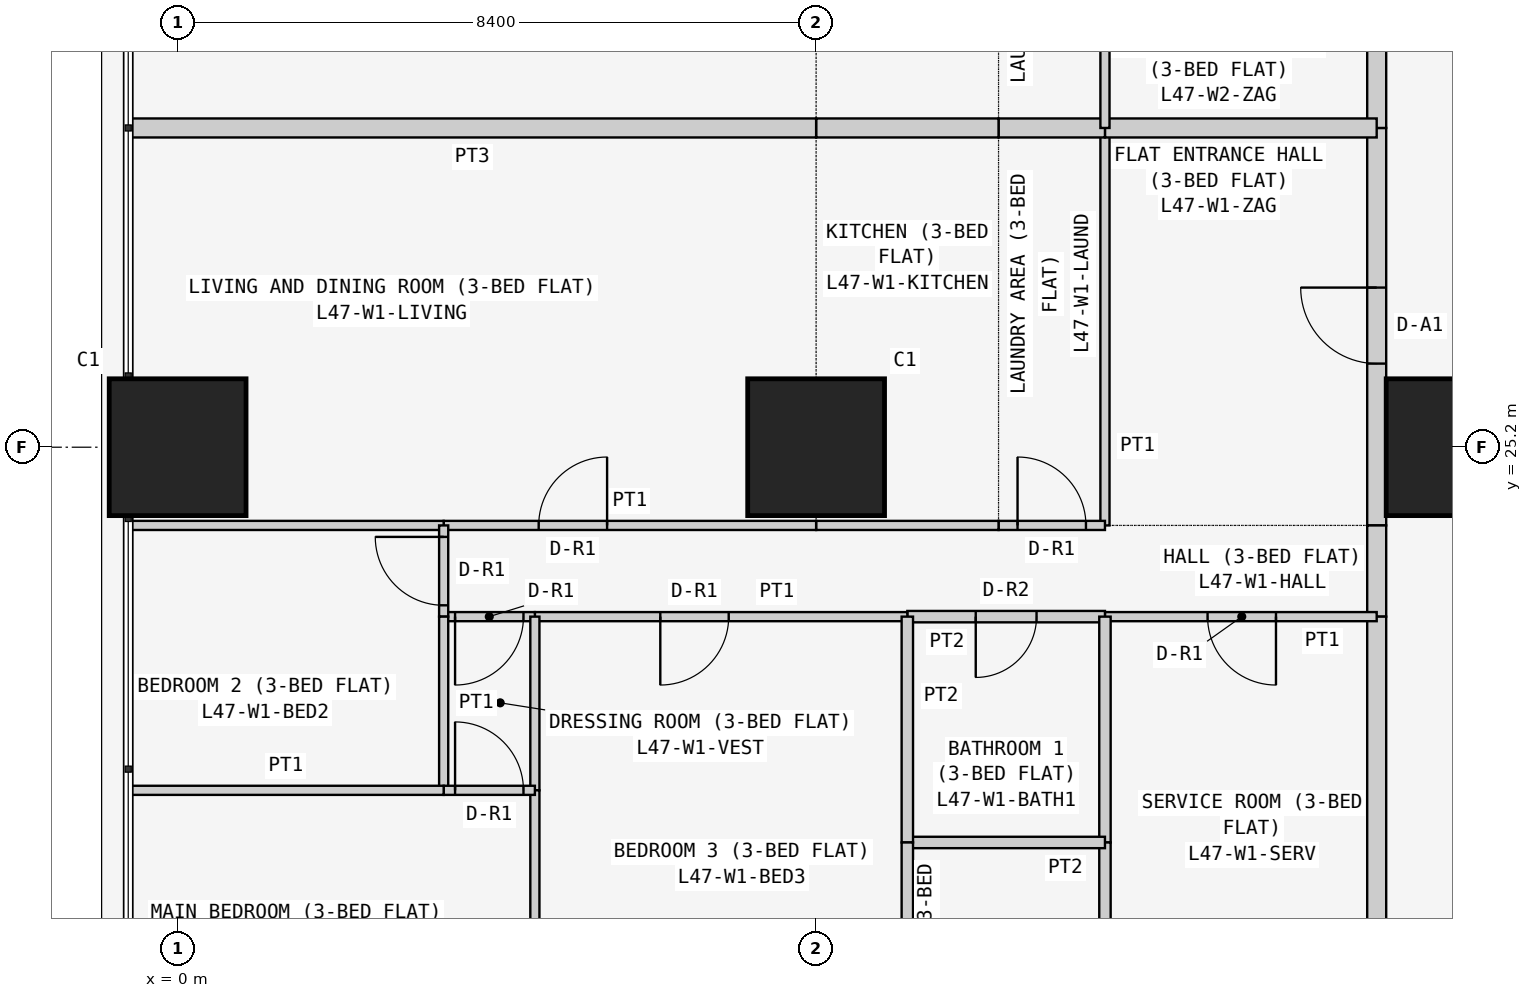
"""IFC4 building model, lengths in metres.
Left out: names, types, materials, properties, quantities, classifications, styles, units other than length and angle.
Written with IfcOpenShell. Run it as: python <this file> out.ifc"""

import sys

from ifc_helpers import new_model, si_unit, direction, frame, frame_2d, origin, origin_2d, place, context, subcontext, project, spatial, rectangle, extrude, element, fill, save


model = new_model("IFC4")
c1 = context("Model", 3, precision=1e-05, world=origin(), true_north=direction((0.0, 1.0)))
c2 = subcontext(c1, "Body", "Model", "MODEL_VIEW")
j1 = project(units=[si_unit("LENGTHUNIT", "METRE"), si_unit("PLANEANGLEUNIT", "RADIAN")], contexts=[c1])
p1 = place(None, origin())
s1 = spatial("IfcSite", under=j1, at=p1, CompositionType="ELEMENT")
p2 = place(p1, origin())
s2 = spatial("IfcBuilding", under=s1, at=p2, CompositionType="ELEMENT")
p3 = place(p2, frame((0.0, 0.0, 183.3)))
s3 = spatial("IfcBuildingStorey", under=s2, at=p3, CompositionType="ELEMENT", Elevation=183.3)
for number, where, z_axis, x_axis in (
    (1, (0.0, 25.2, 0.0), (0.0, 0.0, 1.0), (1.0, 0.0, 0.0)),
    (2, (8.4, 25.2, 0.0), (0.0, 0.0, 1.0), (1.0, 0.0, 0.0)),
    (3, (16.8, 25.2, 0.0), (0.0, 0.0, 1.0), (1.0, 0.0, 0.0)),
):
    element("IfcColumn", number, at=place(p3, frame(where, z_axis=z_axis, x_axis=x_axis)), inside=s3, PredefinedType="COLUMN", context=c2, shape_type="SweptSolid", body=[
        extrude(rectangle(XDim=1.8, YDim=1.8, at=origin_2d()), origin(), (0.0, 0.0, 1.0), 3.6),
    ])
p4 = place(p3, frame((15.775, 24.171, 0.0), z_axis=(0.0, 0.0, 1.0), x_axis=(0.0, 1.0, 0.0)))
e4 = element("IfcWall", 4, at=p4, inside=s3, PredefinedType="PARTITIONING", context=c2, shape_type="SweptSolid", body=[
    extrude(rectangle(XDim=5.229, YDim=0.25, at=frame_2d((2.615, 0.0))), origin(), (0.0, 0.0, 1.0), 3.45),
])
p5 = place(p4, frame((2.129, 0.0, 0.0)))
e5 = element("IfcOpeningElement", 5, at=p5, cuts=e4, PredefinedType="OPENING", context=c2, shape_type="SweptSolid", body=[
    extrude(rectangle(XDim=1.0, YDim=2.1, at=frame_2d((0.5, 1.05))), frame((0.0, 0.135, 0.0), z_axis=(0.0, -1.0, 0.0), x_axis=(1.0, 0.0, 0.0)), (0.0, 0.0, 1.0), 0.27),
])
p6 = place(p3, frame((15.775, 22.971, 0.0), z_axis=(0.0, 0.0, 1.0), x_axis=(0.0, 1.0, 0.0)))
e6 = element("IfcWall", 6, at=p6, inside=s3, PredefinedType="PARTITIONING", context=c2, shape_type="SweptSolid", body=[
    extrude(rectangle(XDim=1.2, YDim=0.25, at=frame_2d((0.6, 0.0))), origin(), (0.0, 0.0, 1.0), 3.45),
])
p7 = place(p3, frame((15.775, 16.1, 0.0), z_axis=(0.0, 0.0, 1.0), x_axis=(0.0, 1.0, 0.0)))
e7 = element("IfcWall", 7, at=p7, inside=s3, PredefinedType="PARTITIONING", context=c2, shape_type="SweptSolid", body=[
    extrude(rectangle(XDim=6.871, YDim=0.25, at=frame_2d((3.436, 0.0))), origin(), (0.0, 0.0, 1.0), 3.45),
])
p8 = place(p3, frame((15.775, 29.4, 0.0), z_axis=(0.0, 0.0, 1.0), x_axis=(0.0, 1.0, 0.0)))
e8 = element("IfcWall", 8, at=p8, inside=s3, PredefinedType="PARTITIONING", context=c2, shape_type="SweptSolid", body=[
    extrude(rectangle(XDim=5.229, YDim=0.25, at=frame_2d((2.615, 0.0))), origin(), (0.0, 0.0, 1.0), 3.45),
])
p9 = place(p8, frame((2.1, 0.0, 0.0)))
e9 = element("IfcOpeningElement", 9, at=p9, cuts=e8, PredefinedType="OPENING", context=c2, shape_type="SweptSolid", body=[
    extrude(rectangle(XDim=1.0, YDim=2.1, at=frame_2d((0.5, 1.05))), frame((0.0, 0.135, 0.0), z_axis=(0.0, -1.0, 0.0), x_axis=(1.0, 0.0, 0.0)), (0.0, 0.0, 1.0), 0.27),
])
p10 = place(p3, frame((12.2, 29.4, 0.0), z_axis=(0.0, 0.0, 1.0), x_axis=(0.0, -1.0, 0.0)))
e10 = element("IfcWall", 10, at=p10, inside=s3, PredefinedType="PARTITIONING", context=c2, shape_type="SweptSolid", body=[
    extrude(rectangle(XDim=5.229, YDim=0.12, at=frame_2d((2.615, 0.0))), origin(), (0.0, 0.0, 1.0), 3.45),
])
p11 = place(p3, frame((15.775, 29.4, 0.0), z_axis=(0.0, 0.0, 1.0), x_axis=(-1.0, 0.0, 0.0)))
e11 = element("IfcWall", 11, at=p11, inside=s3, PredefinedType="PARTITIONING", context=c2, shape_type="SweptSolid", body=[
    extrude(rectangle(XDim=3.575, YDim=0.25, at=frame_2d((1.788, 0.0))), origin(), (0.0, 0.0, 1.0), 3.45),
])
p12 = place(p3, frame((10.8, 24.171, 0.0), z_axis=(0.0, 0.0, 1.0), x_axis=(1.0, 0.0, 0.0)))
e12 = element("IfcWall", 12, at=p12, inside=s3, PredefinedType="PARTITIONING", context=c2, shape_type="SweptSolid", body=[
    extrude(rectangle(XDim=1.4, YDim=0.12, at=frame_2d((0.7, 0.0))), origin(), (0.0, 0.0, 1.0), 3.45),
])
p13 = place(p12, frame((0.25, 0.0, 0.0)))
e13 = element("IfcOpeningElement", 13, at=p13, cuts=e12, PredefinedType="OPENING", context=c2, shape_type="SweptSolid", body=[
    extrude(rectangle(XDim=0.9, YDim=2.1, at=frame_2d((0.45, 1.05))), frame((0.0, 0.07, 0.0), z_axis=(0.0, -1.0, 0.0), x_axis=(1.0, 0.0, 0.0)), (0.0, 0.0, 1.0), 0.14),
])
p14 = place(p3, frame((12.2, 29.4, 0.0), z_axis=(0.0, 0.0, 1.0), x_axis=(-1.0, 0.0, 0.0)))
e14 = element("IfcWall", 14, at=p14, inside=s3, PredefinedType="PARTITIONING", context=c2, shape_type="SweptSolid", body=[
    extrude(rectangle(XDim=1.4, YDim=0.25, at=frame_2d((0.7, 0.0))), origin(), (0.0, 0.0, 1.0), 3.45),
])
p15 = place(p3, frame((8.4, 24.171, 0.0), z_axis=(0.0, 0.0, 1.0), x_axis=(1.0, 0.0, 0.0)))
e15 = element("IfcWall", 15, at=p15, inside=s3, PredefinedType="PARTITIONING", context=c2, shape_type="SweptSolid", body=[
    extrude(rectangle(XDim=2.4, YDim=0.12, at=frame_2d((1.2, 0.0))), origin(), (0.0, 0.0, 1.0), 3.45),
])
p16 = place(p3, frame((10.8, 29.4, 0.0), z_axis=(0.0, 0.0, 1.0), x_axis=(-1.0, 0.0, 0.0)))
e16 = element("IfcWall", 16, at=p16, inside=s3, PredefinedType="PARTITIONING", context=c2, shape_type="SweptSolid", body=[
    extrude(rectangle(XDim=2.4, YDim=0.25, at=frame_2d((1.2, 0.0))), origin(), (0.0, 0.0, 1.0), 3.45),
])
p17 = place(p3, frame((3.5, 24.171, 0.0), z_axis=(0.0, 0.0, 1.0), x_axis=(1.0, 0.0, 0.0)))
e17 = element("IfcWall", 17, at=p17, inside=s3, PredefinedType="PARTITIONING", context=c2, shape_type="SweptSolid", body=[
    extrude(rectangle(XDim=4.9, YDim=0.12, at=frame_2d((2.45, 0.0))), origin(), (0.0, 0.0, 1.0), 3.45),
])
p18 = place(p17, frame((1.25, 0.0, 0.0)))
e18 = element("IfcOpeningElement", 18, at=p18, cuts=e17, PredefinedType="OPENING", context=c2, shape_type="SweptSolid", body=[
    extrude(rectangle(XDim=0.9, YDim=2.1, at=frame_2d((0.45, 1.05))), frame((0.0, 0.07, 0.0), z_axis=(0.0, -1.0, 0.0), x_axis=(1.0, 0.0, 0.0)), (0.0, 0.0, 1.0), 0.14),
])
p19 = place(p3, frame((-0.65, 24.171, 0.0), z_axis=(0.0, 0.0, 1.0), x_axis=(1.0, 0.0, 0.0)))
e19 = element("IfcWall", 19, at=p19, inside=s3, PredefinedType="PARTITIONING", context=c2, shape_type="SweptSolid", body=[
    extrude(rectangle(XDim=4.15, YDim=0.12, at=frame_2d((2.075, 0.0))), origin(), (0.0, 0.0, 1.0), 3.45),
])
p20 = place(p3, frame((8.4, 29.4, 0.0), z_axis=(0.0, 0.0, 1.0), x_axis=(-1.0, 0.0, 0.0)))
e20 = element("IfcWall", 20, at=p20, inside=s3, PredefinedType="PARTITIONING", context=c2, shape_type="SweptSolid", body=[
    extrude(rectangle(XDim=9.05, YDim=0.25, at=frame_2d((4.525, 0.0))), origin(), (0.0, 0.0, 1.0), 3.45),
])
p21 = place(p3, frame((12.2, 22.971, 0.0), z_axis=(0.0, 0.0, 1.0), x_axis=(1.0, 0.0, 0.0)))
e21 = element("IfcWall", 21, at=p21, inside=s3, PredefinedType="PARTITIONING", context=c2, shape_type="SweptSolid", body=[
    extrude(rectangle(XDim=3.575, YDim=0.12, at=frame_2d((1.788, 0.0))), origin(), (0.0, 0.0, 1.0), 3.45),
])
p22 = place(p21, frame((1.35, 0.0, 0.0)))
e22 = element("IfcOpeningElement", 22, at=p22, cuts=e21, PredefinedType="OPENING", context=c2, shape_type="SweptSolid", body=[
    extrude(rectangle(XDim=0.9, YDim=2.1, at=frame_2d((0.45, 1.05))), frame((0.0, 0.07, 0.0), z_axis=(0.0, -1.0, 0.0), x_axis=(1.0, 0.0, 0.0)), (0.0, 0.0, 1.0), 0.14),
])
p23 = place(p3, frame((9.6, 22.971, 0.0), z_axis=(0.0, 0.0, 1.0), x_axis=(1.0, 0.0, 0.0)))
e23 = element("IfcWall", 23, at=p23, inside=s3, PredefinedType="PARTITIONING", context=c2, shape_type="SweptSolid", body=[
    extrude(rectangle(XDim=2.6, YDim=0.15, at=frame_2d((1.3, 0.0))), origin(), (0.0, 0.0, 1.0), 3.45),
])
p24 = place(p23, frame((0.9, 0.0, 0.0)))
e24 = element("IfcOpeningElement", 24, at=p24, cuts=e23, PredefinedType="OPENING", context=c2, shape_type="SweptSolid", body=[
    extrude(rectangle(XDim=0.8, YDim=2.1, at=frame_2d((0.4, 1.05))), frame((0.0, 0.085, 0.0), z_axis=(0.0, -1.0, 0.0), x_axis=(1.0, 0.0, 0.0)), (0.0, 0.0, 1.0), 0.17),
])
p25 = place(p3, frame((4.7, 22.971, 0.0), z_axis=(0.0, 0.0, 1.0), x_axis=(1.0, 0.0, 0.0)))
e25 = element("IfcWall", 25, at=p25, inside=s3, PredefinedType="PARTITIONING", context=c2, shape_type="SweptSolid", body=[
    extrude(rectangle(XDim=4.9, YDim=0.12, at=frame_2d((2.45, 0.0))), origin(), (0.0, 0.0, 1.0), 3.45),
])
p26 = place(p25, frame((1.65, 0.0, 0.0)))
e26 = element("IfcOpeningElement", 26, at=p26, cuts=e25, PredefinedType="OPENING", context=c2, shape_type="SweptSolid", body=[
    extrude(rectangle(XDim=0.9, YDim=2.1, at=frame_2d((0.45, 1.05))), frame((0.0, 0.07, 0.0), z_axis=(0.0, -1.0, 0.0), x_axis=(1.0, 0.0, 0.0)), (0.0, 0.0, 1.0), 0.14),
])
p27 = place(p3, frame((3.5, 22.971, 0.0), z_axis=(0.0, 0.0, 1.0), x_axis=(1.0, 0.0, 0.0)))
e27 = element("IfcWall", 27, at=p27, inside=s3, PredefinedType="PARTITIONING", context=c2, shape_type="SweptSolid", body=[
    extrude(rectangle(XDim=1.2, YDim=0.12, at=frame_2d((0.6, 0.0))), origin(), (0.0, 0.0, 1.0), 3.45),
])
p28 = place(p27, frame((0.15, 0.0, 0.0)))
e28 = element("IfcOpeningElement", 28, at=p28, cuts=e27, PredefinedType="OPENING", context=c2, shape_type="SweptSolid", body=[
    extrude(rectangle(XDim=0.9, YDim=2.1, at=frame_2d((0.45, 1.05))), frame((0.0, 0.07, 0.0), z_axis=(0.0, -1.0, 0.0), x_axis=(1.0, 0.0, 0.0)), (0.0, 0.0, 1.0), 0.14),
])
p29 = place(p3, frame((3.5, 24.171, 0.0), z_axis=(0.0, 0.0, 1.0), x_axis=(0.0, -1.0, 0.0)))
e29 = element("IfcWall", 29, at=p29, inside=s3, PredefinedType="PARTITIONING", context=c2, shape_type="SweptSolid", body=[
    extrude(rectangle(XDim=1.2, YDim=0.12, at=frame_2d((0.6, 0.0))), origin(), (0.0, 0.0, 1.0), 3.45),
])
p30 = place(p29, frame((0.151, 0.0, 0.0)))
e30 = element("IfcOpeningElement", 30, at=p30, cuts=e29, PredefinedType="OPENING", context=c2, shape_type="SweptSolid", body=[
    extrude(rectangle(XDim=0.9, YDim=2.1, at=frame_2d((0.45, 1.05))), frame((0.0, 0.07, 0.0), z_axis=(0.0, -1.0, 0.0), x_axis=(1.0, 0.0, 0.0)), (0.0, 0.0, 1.0), 0.14),
])
p31 = place(p3, frame((12.2, 22.971, 0.0), z_axis=(0.0, 0.0, 1.0), x_axis=(0.0, -1.0, 0.0)))
e31 = element("IfcWall", 31, at=p31, inside=s3, PredefinedType="PARTITIONING", context=c2, shape_type="SweptSolid", body=[
    extrude(rectangle(XDim=2.971, YDim=0.15, at=frame_2d((1.485, 0.0))), origin(), (0.0, 0.0, 1.0), 3.45),
])
p32 = place(p3, frame((12.2, 20.0, 0.0), z_axis=(0.0, 0.0, 1.0), x_axis=(0.0, -1.0, 0.0)))
e32 = element("IfcWall", 32, at=p32, inside=s3, PredefinedType="PARTITIONING", context=c2, shape_type="SweptSolid", body=[
    extrude(rectangle(XDim=3.9, YDim=0.15, at=frame_2d((1.95, 0.0))), origin(), (0.0, 0.0, 1.0), 3.45),
])
p33 = place(p32, frame((1.45, 0.0, 0.0)))
e33 = element("IfcOpeningElement", 33, at=p33, cuts=e32, PredefinedType="OPENING", context=c2, shape_type="SweptSolid", body=[
    extrude(rectangle(XDim=0.8, YDim=2.1, at=frame_2d((0.4, 1.05))), frame((0.0, 0.085, 0.0), z_axis=(0.0, -1.0, 0.0), x_axis=(1.0, 0.0, 0.0)), (0.0, 0.0, 1.0), 0.17),
])
p34 = place(p3, frame((9.6, 20.0, 0.0), z_axis=(0.0, 0.0, 1.0), x_axis=(1.0, 0.0, 0.0)))
e34 = element("IfcWall", 34, at=p34, inside=s3, PredefinedType="PARTITIONING", context=c2, shape_type="SweptSolid", body=[
    extrude(rectangle(XDim=2.6, YDim=0.15, at=frame_2d((1.3, 0.0))), origin(), (0.0, 0.0, 1.0), 3.45),
])
p35 = place(p3, frame((9.6, 22.971, 0.0), z_axis=(0.0, 0.0, 1.0), x_axis=(0.0, -1.0, 0.0)))
e35 = element("IfcWall", 35, at=p35, inside=s3, PredefinedType="PARTITIONING", context=c2, shape_type="SweptSolid", body=[
    extrude(rectangle(XDim=2.971, YDim=0.15, at=frame_2d((1.485, 0.0))), origin(), (0.0, 0.0, 1.0), 3.45),
])
p36 = place(p3, frame((9.6, 20.0, 0.0), z_axis=(0.0, 0.0, 1.0), x_axis=(0.0, -1.0, 0.0)))
e36 = element("IfcWall", 36, at=p36, inside=s3, PredefinedType="PARTITIONING", context=c2, shape_type="SweptSolid", body=[
    extrude(rectangle(XDim=3.9, YDim=0.15, at=frame_2d((1.95, 0.0))), origin(), (0.0, 0.0, 1.0), 3.45),
])
p37 = place(p3, frame((4.7, 22.971, 0.0), z_axis=(0.0, 0.0, 1.0), x_axis=(0.0, -1.0, 0.0)))
e37 = element("IfcWall", 37, at=p37, inside=s3, PredefinedType="PARTITIONING", context=c2, shape_type="SweptSolid", body=[
    extrude(rectangle(XDim=2.285, YDim=0.12, at=frame_2d((1.143, 0.0))), origin(), (0.0, 0.0, 1.0), 3.45),
])
p38 = place(p3, frame((4.7, 20.686, 0.0), z_axis=(0.0, 0.0, 1.0), x_axis=(0.0, -1.0, 0.0)))
e38 = element("IfcWall", 38, at=p38, inside=s3, PredefinedType="PARTITIONING", context=c2, shape_type="SweptSolid", body=[
    extrude(rectangle(XDim=4.586, YDim=0.12, at=frame_2d((2.293, 0.0))), origin(), (0.0, 0.0, 1.0), 3.45),
])
p39 = place(p3, frame((3.5, 22.971, 0.0), z_axis=(0.0, 0.0, 1.0), x_axis=(0.0, -1.0, 0.0)))
e39 = element("IfcWall", 39, at=p39, inside=s3, PredefinedType="PARTITIONING", context=c2, shape_type="SweptSolid", body=[
    extrude(rectangle(XDim=2.285, YDim=0.12, at=frame_2d((1.143, 0.0))), origin(), (0.0, 0.0, 1.0), 3.45),
])
p40 = place(p3, frame((3.5, 20.686, 0.0), z_axis=(0.0, 0.0, 1.0), x_axis=(1.0, 0.0, 0.0)))
e40 = element("IfcWall", 40, at=p40, inside=s3, PredefinedType="PARTITIONING", context=c2, shape_type="SweptSolid", body=[
    extrude(rectangle(XDim=1.2, YDim=0.12, at=frame_2d((0.6, 0.0))), origin(), (0.0, 0.0, 1.0), 3.45),
])
p41 = place(p40, frame((0.15, 0.0, 0.0)))
e41 = element("IfcOpeningElement", 41, at=p41, cuts=e40, PredefinedType="OPENING", context=c2, shape_type="SweptSolid", body=[
    extrude(rectangle(XDim=0.9, YDim=2.1, at=frame_2d((0.45, 1.05))), frame((0.0, 0.07, 0.0), z_axis=(0.0, -1.0, 0.0), x_axis=(1.0, 0.0, 0.0)), (0.0, 0.0, 1.0), 0.14),
])
p42 = place(p3, frame((-0.65, 20.686, 0.0), z_axis=(0.0, 0.0, 1.0), x_axis=(1.0, 0.0, 0.0)))
e42 = element("IfcWall", 42, at=p42, inside=s3, PredefinedType="PARTITIONING", context=c2, shape_type="SweptSolid", body=[
    extrude(rectangle(XDim=4.15, YDim=0.12, at=frame_2d((2.075, 0.0))), origin(), (0.0, 0.0, 1.0), 3.45),
])
p43 = place(p3, frame((12.2, 29.4, 0.0), z_axis=(0.0, 0.0, 1.0), x_axis=(0.0, 1.0, 0.0)))
e43 = element("IfcWall", 43, at=p43, inside=s3, PredefinedType="PARTITIONING", context=c2, shape_type="SweptSolid", body=[
    extrude(rectangle(XDim=5.229, YDim=0.12, at=frame_2d((2.615, 0.0))), origin(), (0.0, 0.0, 1.0), 3.45),
])
p44 = place(p5, origin())
e44 = element("IfcDoor", 44, at=p44, inside=s3, OperationType="SINGLE_SWING_RIGHT", PredefinedType="DOOR", context=c2, shape_type="SweptSolid", body=[
    extrude(rectangle(XDim=1.0, YDim=2.1, at=frame_2d((0.5, 1.05))), frame((0.0, 0.025, 0.0), z_axis=(0.0, -1.0, 0.0), x_axis=(1.0, 0.0, 0.0)), (0.0, 0.0, 1.0), 0.05),
])
fill(e5, e44)
p45 = place(p13, origin())
e45 = element("IfcDoor", 45, at=p45, inside=s3, OperationType="SINGLE_SWING_LEFT", PredefinedType="DOOR", context=c2, shape_type="SweptSolid", body=[
    extrude(rectangle(XDim=0.9, YDim=2.1, at=frame_2d((0.45, 1.05))), frame((0.0, 0.025, 0.0), z_axis=(0.0, -1.0, 0.0), x_axis=(1.0, 0.0, 0.0)), (0.0, 0.0, 1.0), 0.05),
])
fill(e13, e45)
p46 = place(p18, origin())
e46 = element("IfcDoor", 46, at=p46, inside=s3, OperationType="SINGLE_SWING_RIGHT", PredefinedType="DOOR", context=c2, shape_type="SweptSolid", body=[
    extrude(rectangle(XDim=0.9, YDim=2.1, at=frame_2d((0.45, 1.05))), frame((0.0, 0.025, 0.0), z_axis=(0.0, -1.0, 0.0), x_axis=(1.0, 0.0, 0.0)), (0.0, 0.0, 1.0), 0.05),
])
fill(e18, e46)
p47 = place(p22, frame((0.9, 0.0, 0.0), z_axis=(0.0, 0.0, 1.0), x_axis=(-1.0, 0.0, 0.0)))
e47 = element("IfcDoor", 47, at=p47, inside=s3, OperationType="SINGLE_SWING_LEFT", PredefinedType="DOOR", context=c2, shape_type="SweptSolid", body=[
    extrude(rectangle(XDim=0.9, YDim=2.1, at=frame_2d((0.45, 1.05))), frame((0.0, 0.025, 0.0), z_axis=(0.0, -1.0, 0.0), x_axis=(1.0, 0.0, 0.0)), (0.0, 0.0, 1.0), 0.05),
])
fill(e22, e47)
p48 = place(p24, frame((0.8, 0.0, 0.0), z_axis=(0.0, 0.0, 1.0), x_axis=(-1.0, 0.0, 0.0)))
e48 = element("IfcDoor", 48, at=p48, inside=s3, OperationType="SINGLE_SWING_RIGHT", PredefinedType="DOOR", context=c2, shape_type="SweptSolid", body=[
    extrude(rectangle(XDim=0.8, YDim=2.1, at=frame_2d((0.4, 1.05))), frame((0.0, 0.025, 0.0), z_axis=(0.0, -1.0, 0.0), x_axis=(1.0, 0.0, 0.0)), (0.0, 0.0, 1.0), 0.05),
])
fill(e24, e48)
p49 = place(p26, frame((0.9, 0.0, 0.0), z_axis=(0.0, 0.0, 1.0), x_axis=(-1.0, 0.0, 0.0)))
e49 = element("IfcDoor", 49, at=p49, inside=s3, OperationType="SINGLE_SWING_RIGHT", PredefinedType="DOOR", context=c2, shape_type="SweptSolid", body=[
    extrude(rectangle(XDim=0.9, YDim=2.1, at=frame_2d((0.45, 1.05))), frame((0.0, 0.025, 0.0), z_axis=(0.0, -1.0, 0.0), x_axis=(1.0, 0.0, 0.0)), (0.0, 0.0, 1.0), 0.05),
])
fill(e26, e49)
p50 = place(p28, frame((0.9, 0.0, 0.0), z_axis=(0.0, 0.0, 1.0), x_axis=(-1.0, 0.0, 0.0)))
e50 = element("IfcDoor", 50, at=p50, inside=s3, OperationType="SINGLE_SWING_RIGHT", PredefinedType="DOOR", context=c2, shape_type="SweptSolid", body=[
    extrude(rectangle(XDim=0.9, YDim=2.1, at=frame_2d((0.45, 1.05))), frame((0.0, 0.025, 0.0), z_axis=(0.0, -1.0, 0.0), x_axis=(1.0, 0.0, 0.0)), (0.0, 0.0, 1.0), 0.05),
])
fill(e28, e50)
p51 = place(p41, origin())
e51 = element("IfcDoor", 51, at=p51, inside=s3, OperationType="SINGLE_SWING_LEFT", PredefinedType="DOOR", context=c2, shape_type="SweptSolid", body=[
    extrude(rectangle(XDim=0.9, YDim=2.1, at=frame_2d((0.45, 1.05))), frame((0.0, 0.025, 0.0), z_axis=(0.0, -1.0, 0.0), x_axis=(1.0, 0.0, 0.0)), (0.0, 0.0, 1.0), 0.05),
])
fill(e41, e51)
p52 = place(p30, frame((0.9, 0.0, 0.0), z_axis=(0.0, 0.0, 1.0), x_axis=(-1.0, 0.0, 0.0)))
e52 = element("IfcDoor", 52, at=p52, inside=s3, OperationType="SINGLE_SWING_RIGHT", PredefinedType="DOOR", context=c2, shape_type="SweptSolid", body=[
    extrude(rectangle(XDim=0.9, YDim=2.1, at=frame_2d((0.45, 1.05))), frame((0.0, 0.025, 0.0), z_axis=(0.0, -1.0, 0.0), x_axis=(1.0, 0.0, 0.0)), (0.0, 0.0, 1.0), 0.05),
])
fill(e30, e52)
save(model, sys.argv[1])
